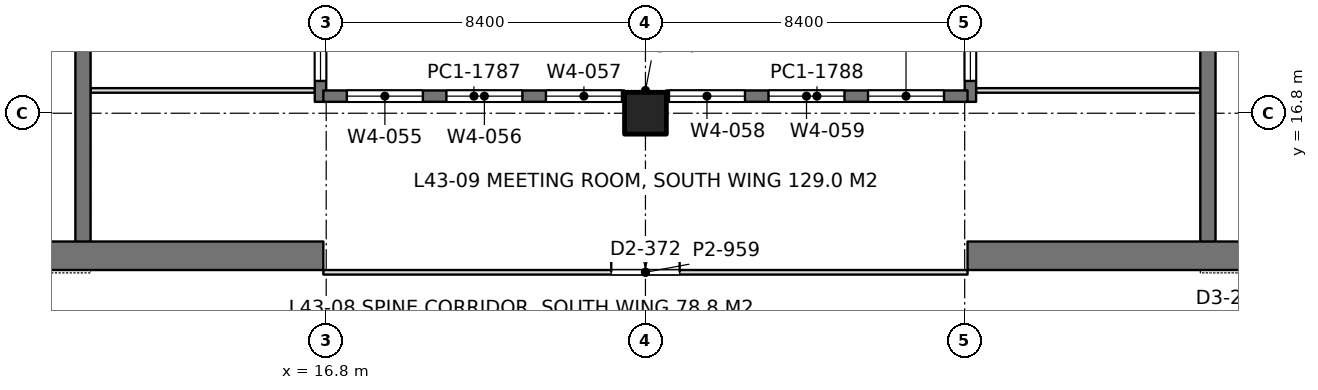
"""IFC4 building model, lengths in metres.
Left out: names, types, materials, properties, quantities, classifications, styles, units other than length and angle.
Written with IfcOpenShell. Run it as: python <this file> out.ifc"""

import sys

from ifc_helpers import new_model, si_unit, direction, frame, frame_2d, origin, origin_2d, place, context, subcontext, project, spatial, rectangle, extrude, element, fill, save


model = new_model("IFC4")
c1 = context("Model", 3, precision=1e-05, world=origin(), true_north=direction((0.0, 1.0)))
c2 = subcontext(c1, "Body", "Model", "MODEL_VIEW")
j1 = project(units=[si_unit("LENGTHUNIT", "METRE"), si_unit("PLANEANGLEUNIT", "RADIAN")], contexts=[c1])
p1 = place(None, origin())
s1 = spatial("IfcSite", under=j1, at=p1, CompositionType="ELEMENT")
p2 = place(p1, origin())
s2 = spatial("IfcBuilding", under=s1, at=p2, CompositionType="ELEMENT")
p3 = place(p2, frame((0.0, 0.0, 190.2)))
s3 = spatial("IfcBuildingStorey", under=s2, at=p3, CompositionType="ELEMENT", Elevation=190.2)
p4 = place(p3, frame((25.2, 16.8, 0.0), z_axis=(0.0, 0.0, 1.0), x_axis=(1.0, 0.0, 0.0)))
e1 = element("IfcColumn", 1, at=p4, inside=s3, PredefinedType="COLUMN", context=c2, shape_type="SweptSolid", body=[
    extrude(rectangle(XDim=1.1, YDim=1.1, at=origin_2d()), origin(), (0.0, 0.0, 1.0), 4.2),
])
p5 = place(p3, frame((-1.125, 13.05, 0.0), z_axis=(0.0, 0.0, 1.0), x_axis=(1.0, 0.0, 0.0)))
e2 = element("IfcWall", 2, at=p5, inside=s3, PredefinedType="SHEAR", context=c2, shape_type="SweptSolid", body=[
    extrude(rectangle(XDim=17.85, YDim=0.75, at=frame_2d((8.925, 0.0))), origin(), (0.0, 0.0, 1.0), 4.2),
])
p6 = place(p5, frame((8.875, 0.0, 0.0)))
e3 = element("IfcOpeningElement", 3, at=p6, cuts=e2, PredefinedType="OPENING", context=c2, shape_type="SweptSolid", body=[
    extrude(rectangle(XDim=1.8, YDim=2.4, at=frame_2d((0.9, 1.2))), frame((0.0, 0.385, 0.0), z_axis=(0.0, -1.0, 0.0), x_axis=(1.0, 0.0, 0.0)), (0.0, 0.0, 1.0), 0.77),
])
p7 = place(p3, frame((10.4, 13.05, 0.0), z_axis=(0.0, 0.0, 1.0), x_axis=(0.0, 1.0, 0.0)))
e4 = element("IfcWall", 4, at=p7, inside=s3, PredefinedType="SHEAR", context=c2, shape_type="SweptSolid", body=[
    extrude(rectangle(XDim=24.3, YDim=0.4, at=frame_2d((12.15, 0.0))), origin(), (0.0, 0.0, 1.0), 4.2),
])
p8 = place(p7, frame((15.75, 0.0, 0.0)))
e5 = element("IfcOpeningElement", 5, at=p8, cuts=e4, PredefinedType="OPENING", context=c2, shape_type="SweptSolid", body=[
    extrude(rectangle(XDim=1.1, YDim=2.2, at=frame_2d((0.55, 1.1))), frame((0.0, 0.21, 0.0), z_axis=(0.0, -1.0, 0.0), x_axis=(1.0, 0.0, 0.0)), (0.0, 0.0, 1.0), 0.42),
])
p9 = place(p7, frame((18.6, 0.0, 0.0)))
e6 = element("IfcOpeningElement", 6, at=p9, cuts=e4, PredefinedType="OPENING", context=c2, shape_type="SweptSolid", body=[
    extrude(rectangle(XDim=1.1, YDim=2.2, at=frame_2d((0.55, 1.1))), frame((0.0, 0.21, 0.0), z_axis=(0.0, -1.0, 0.0), x_axis=(1.0, 0.0, 0.0)), (0.0, 0.0, 1.0), 0.42),
])
p10 = place(p7, frame((21.45, 0.0, 0.0)))
e7 = element("IfcOpeningElement", 7, at=p10, cuts=e4, PredefinedType="OPENING", context=c2, shape_type="SweptSolid", body=[
    extrude(rectangle(XDim=1.1, YDim=2.2, at=frame_2d((0.55, 1.1))), frame((0.0, 0.21, 0.0), z_axis=(0.0, -1.0, 0.0), x_axis=(1.0, 0.0, 0.0)), (0.0, 0.0, 1.0), 0.42),
])
p11 = place(p7, frame((8.65, 0.0, 0.0)))
e8 = element("IfcOpeningElement", 8, at=p11, cuts=e4, PredefinedType="OPENING", context=c2, shape_type="SweptSolid", body=[
    extrude(rectangle(XDim=1.8, YDim=2.4, at=frame_2d((0.9, 1.2))), frame((0.0, 0.21, 0.0), z_axis=(0.0, -1.0, 0.0), x_axis=(1.0, 0.0, 0.0)), (0.0, 0.0, 1.0), 0.42),
])
p12 = place(p3, frame((33.675, 13.05, 0.0), z_axis=(0.0, 0.0, 1.0), x_axis=(1.0, 0.0, 0.0)))
e9 = element("IfcWall", 9, at=p12, inside=s3, PredefinedType="SHEAR", context=c2, shape_type="SweptSolid", body=[
    extrude(rectangle(XDim=17.85, YDim=0.75, at=frame_2d((8.925, 0.0))), origin(), (0.0, 0.0, 1.0), 4.2),
])
p13 = place(p12, frame((7.175, 0.0, 0.0)))
e10 = element("IfcOpeningElement", 10, at=p13, cuts=e9, PredefinedType="OPENING", context=c2, shape_type="SweptSolid", body=[
    extrude(rectangle(XDim=1.8, YDim=2.4, at=frame_2d((0.9, 1.2))), frame((0.0, 0.385, 0.0), z_axis=(0.0, -1.0, 0.0), x_axis=(1.0, 0.0, 0.0)), (0.0, 0.0, 1.0), 0.77),
])
p14 = place(p3, frame((40.0, 13.05, 0.0), z_axis=(0.0, 0.0, 1.0), x_axis=(0.0, 1.0, 0.0)))
e11 = element("IfcWall", 11, at=p14, inside=s3, PredefinedType="SHEAR", context=c2, shape_type="SweptSolid", body=[
    extrude(rectangle(XDim=24.3, YDim=0.4, at=frame_2d((12.15, 0.0))), origin(), (0.0, 0.0, 1.0), 4.2),
])
p15 = place(p14, frame((15.75, 0.0, 0.0)))
e12 = element("IfcOpeningElement", 12, at=p15, cuts=e11, PredefinedType="OPENING", context=c2, shape_type="SweptSolid", body=[
    extrude(rectangle(XDim=1.1, YDim=2.2, at=frame_2d((0.55, 1.1))), frame((0.0, 0.21, 0.0), z_axis=(0.0, -1.0, 0.0), x_axis=(1.0, 0.0, 0.0)), (0.0, 0.0, 1.0), 0.42),
])
p16 = place(p14, frame((18.6, 0.0, 0.0)))
e13 = element("IfcOpeningElement", 13, at=p16, cuts=e11, PredefinedType="OPENING", context=c2, shape_type="SweptSolid", body=[
    extrude(rectangle(XDim=1.1, YDim=2.2, at=frame_2d((0.55, 1.1))), frame((0.0, 0.21, 0.0), z_axis=(0.0, -1.0, 0.0), x_axis=(1.0, 0.0, 0.0)), (0.0, 0.0, 1.0), 0.42),
])
p17 = place(p14, frame((21.45, 0.0, 0.0)))
e14 = element("IfcOpeningElement", 14, at=p17, cuts=e11, PredefinedType="OPENING", context=c2, shape_type="SweptSolid", body=[
    extrude(rectangle(XDim=1.1, YDim=2.2, at=frame_2d((0.55, 1.1))), frame((0.0, 0.21, 0.0), z_axis=(0.0, -1.0, 0.0), x_axis=(1.0, 0.0, 0.0)), (0.0, 0.0, 1.0), 0.42),
])
p18 = place(p14, frame((8.65, 0.0, 0.0)))
e15 = element("IfcOpeningElement", 15, at=p18, cuts=e11, PredefinedType="OPENING", context=c2, shape_type="SweptSolid", body=[
    extrude(rectangle(XDim=1.8, YDim=2.4, at=frame_2d((0.9, 1.2))), frame((0.0, 0.21, 0.0), z_axis=(0.0, -1.0, 0.0), x_axis=(1.0, 0.0, 0.0)), (0.0, 0.0, 1.0), 0.42),
])
p19 = place(p3, frame((16.65, 17.1, 0.0), z_axis=(0.0, 0.0, 1.0), x_axis=(0.0, 1.0, 0.0)))
e16 = element("IfcWall", 16, at=p19, inside=s3, PredefinedType="SOLIDWALL", context=c2, shape_type="SweptSolid", body=[
    extrude(rectangle(XDim=10.7, YDim=0.3, at=frame_2d((5.35, 0.0))), origin(), (0.0, 0.0, 1.0), 4.05),
])
p20 = place(p19, frame((0.55, 0.0, 0.9)))
e17 = element("IfcOpeningElement", 17, at=p20, cuts=e16, PredefinedType="OPENING", context=c2, shape_type="SweptSolid", body=[
    extrude(rectangle(XDim=2.0, YDim=1.9, at=frame_2d((1.0, 0.95))), frame((0.0, 0.16, 0.0), z_axis=(0.0, -1.0, 0.0), x_axis=(1.0, 0.0, 0.0)), (0.0, 0.0, 1.0), 0.32),
])
p21 = place(p19, frame((2.9, 0.0, 0.9)))
e18 = element("IfcOpeningElement", 18, at=p21, cuts=e16, PredefinedType="OPENING", context=c2, shape_type="SweptSolid", body=[
    extrude(rectangle(XDim=2.0, YDim=1.9, at=frame_2d((1.0, 0.95))), frame((0.0, 0.16, 0.0), z_axis=(0.0, -1.0, 0.0), x_axis=(1.0, 0.0, 0.0)), (0.0, 0.0, 1.0), 0.32),
])
p22 = place(p19, frame((7.675, 0.0, 0.9)))
e19 = element("IfcOpeningElement", 19, at=p22, cuts=e16, PredefinedType="OPENING", context=c2, shape_type="SweptSolid", body=[
    extrude(rectangle(XDim=2.0, YDim=1.9, at=frame_2d((1.0, 0.95))), frame((0.0, 0.16, 0.0), z_axis=(0.0, -1.0, 0.0), x_axis=(1.0, 0.0, 0.0)), (0.0, 0.0, 1.0), 0.32),
])
p23 = place(p3, frame((33.75, 17.1, 0.0), z_axis=(0.0, 0.0, 1.0), x_axis=(0.0, 1.0, 0.0)))
e20 = element("IfcWall", 20, at=p23, inside=s3, PredefinedType="SOLIDWALL", context=c2, shape_type="SweptSolid", body=[
    extrude(rectangle(XDim=10.7, YDim=0.3, at=frame_2d((5.35, 0.0))), origin(), (0.0, 0.0, 1.0), 4.05),
])
p24 = place(p23, frame((0.55, 0.0, 0.9)))
e21 = element("IfcOpeningElement", 21, at=p24, cuts=e20, PredefinedType="OPENING", context=c2, shape_type="SweptSolid", body=[
    extrude(rectangle(XDim=2.0, YDim=1.9, at=frame_2d((1.0, 0.95))), frame((0.0, 0.16, 0.0), z_axis=(0.0, -1.0, 0.0), x_axis=(1.0, 0.0, 0.0)), (0.0, 0.0, 1.0), 0.32),
])
p25 = place(p23, frame((2.9, 0.0, 0.9)))
e22 = element("IfcOpeningElement", 22, at=p25, cuts=e20, PredefinedType="OPENING", context=c2, shape_type="SweptSolid", body=[
    extrude(rectangle(XDim=2.0, YDim=1.9, at=frame_2d((1.0, 0.95))), frame((0.0, 0.16, 0.0), z_axis=(0.0, -1.0, 0.0), x_axis=(1.0, 0.0, 0.0)), (0.0, 0.0, 1.0), 0.32),
])
p26 = place(p23, frame((7.675, 0.0, 0.9)))
e23 = element("IfcOpeningElement", 23, at=p26, cuts=e20, PredefinedType="OPENING", context=c2, shape_type="SweptSolid", body=[
    extrude(rectangle(XDim=2.0, YDim=1.9, at=frame_2d((1.0, 0.95))), frame((0.0, 0.16, 0.0), z_axis=(0.0, -1.0, 0.0), x_axis=(1.0, 0.0, 0.0)), (0.0, 0.0, 1.0), 0.32),
])
p27 = place(p3, frame((16.725, 17.25, 0.0), z_axis=(0.0, 0.0, 1.0), x_axis=(1.0, 0.0, 0.0)))
e24 = element("IfcWall", 24, at=p27, inside=s3, PredefinedType="SOLIDWALL", context=c2, shape_type="SweptSolid", body=[
    extrude(rectangle(XDim=7.925, YDim=0.3, at=frame_2d((3.962, 0.0))), origin(), (0.0, 0.0, 1.0), 4.05),
])
p28 = place(p27, frame((0.619, 0.0, 0.9)))
e25 = element("IfcOpeningElement", 25, at=p28, cuts=e24, PredefinedType="OPENING", context=c2, shape_type="SweptSolid", body=[
    extrude(rectangle(XDim=2.0, YDim=1.9, at=frame_2d((1.0, 0.95))), frame((0.0, 0.16, 0.0), z_axis=(0.0, -1.0, 0.0), x_axis=(1.0, 0.0, 0.0)), (0.0, 0.0, 1.0), 0.32),
])
p29 = place(p27, frame((3.238, 0.0, 0.9)))
e26 = element("IfcOpeningElement", 26, at=p29, cuts=e24, PredefinedType="OPENING", context=c2, shape_type="SweptSolid", body=[
    extrude(rectangle(XDim=2.0, YDim=1.9, at=frame_2d((1.0, 0.95))), frame((0.0, 0.16, 0.0), z_axis=(0.0, -1.0, 0.0), x_axis=(1.0, 0.0, 0.0)), (0.0, 0.0, 1.0), 0.32),
])
p30 = place(p27, frame((5.856, 0.0, 0.9)))
e27 = element("IfcOpeningElement", 27, at=p30, cuts=e24, PredefinedType="OPENING", context=c2, shape_type="SweptSolid", body=[
    extrude(rectangle(XDim=2.0, YDim=1.9, at=frame_2d((1.0, 0.95))), frame((0.0, 0.16, 0.0), z_axis=(0.0, -1.0, 0.0), x_axis=(1.0, 0.0, 0.0)), (0.0, 0.0, 1.0), 0.32),
])
p31 = place(p3, frame((25.75, 17.25, 0.0), z_axis=(0.0, 0.0, 1.0), x_axis=(1.0, 0.0, 0.0)))
e28 = element("IfcWall", 28, at=p31, inside=s3, PredefinedType="SOLIDWALL", context=c2, shape_type="SweptSolid", body=[
    extrude(rectangle(XDim=7.925, YDim=0.3, at=frame_2d((3.962, 0.0))), origin(), (0.0, 0.0, 1.0), 4.05),
])
p32 = place(p31, frame((0.069, 0.0, 0.9)))
e29 = element("IfcOpeningElement", 29, at=p32, cuts=e28, PredefinedType="OPENING", context=c2, shape_type="SweptSolid", body=[
    extrude(rectangle(XDim=2.0, YDim=1.9, at=frame_2d((1.0, 0.95))), frame((0.0, 0.16, 0.0), z_axis=(0.0, -1.0, 0.0), x_axis=(1.0, 0.0, 0.0)), (0.0, 0.0, 1.0), 0.32),
])
p33 = place(p31, frame((2.688, 0.0, 0.9)))
e30 = element("IfcOpeningElement", 30, at=p33, cuts=e28, PredefinedType="OPENING", context=c2, shape_type="SweptSolid", body=[
    extrude(rectangle(XDim=2.0, YDim=1.9, at=frame_2d((1.0, 0.95))), frame((0.0, 0.16, 0.0), z_axis=(0.0, -1.0, 0.0), x_axis=(1.0, 0.0, 0.0)), (0.0, 0.0, 1.0), 0.32),
])
p34 = place(p31, frame((5.306, 0.0, 0.9)))
e31 = element("IfcOpeningElement", 31, at=p34, cuts=e28, PredefinedType="OPENING", context=c2, shape_type="SweptSolid", body=[
    extrude(rectangle(XDim=2.0, YDim=1.9, at=frame_2d((1.0, 0.95))), frame((0.0, 0.16, 0.0), z_axis=(0.0, -1.0, 0.0), x_axis=(1.0, 0.0, 0.0)), (0.0, 0.0, 1.0), 0.32),
])
for number, where, z_axis, x_axis in (
    (32, (10.598, 17.4, 0.0), (0.0, 0.0, 1.0), (1.0, 0.0, 0.0)),
    (33, (33.898, 17.4, 0.0), (0.0, 0.0, 1.0), (1.0, 0.0, 0.0)),
):
    element("IfcWall", number, at=place(p3, frame(where, z_axis=z_axis, x_axis=x_axis)), inside=s3, PredefinedType="PARTITIONING", context=c2, shape_type="SweptSolid", body=[
        extrude(rectangle(XDim=5.904, YDim=0.12, at=frame_2d((2.952, 0.0))), origin(), (0.0, 0.0, 1.0), 3.55),
    ])
p35 = place(p3, frame((16.725, 12.615, 0.0), z_axis=(0.0, 0.0, 1.0), x_axis=(1.0, 0.0, 0.0)))
e34 = element("IfcWall", 34, at=p35, inside=s3, PredefinedType="PARTITIONING", context=c2, shape_type="SweptSolid", body=[
    extrude(rectangle(XDim=16.95, YDim=0.12, at=frame_2d((8.475, 0.0))), origin(), (0.0, 0.0, 1.0), 3.55),
])
p36 = place(p35, frame((7.575, 0.0, 0.0)))
e35 = element("IfcOpeningElement", 35, at=p36, cuts=e34, PredefinedType="OPENING", context=c2, shape_type="SweptSolid", body=[
    extrude(rectangle(XDim=1.8, YDim=2.2, at=frame_2d((0.9, 1.1))), frame((0.0, 0.07, 0.0), z_axis=(0.0, -1.0, 0.0), x_axis=(1.0, 0.0, 0.0)), (0.0, 0.0, 1.0), 0.14),
])
p37 = place(p20, origin())
e36 = element("IfcWindow", 36, at=p37, inside=s3, PartitioningType="SINGLE_PANEL", PredefinedType="WINDOW", context=c2, shape_type="SweptSolid", body=[
    extrude(rectangle(XDim=2.0, YDim=1.9, at=frame_2d((1.0, 0.95))), frame((0.0, 0.03, 0.0), z_axis=(0.0, -1.0, 0.0), x_axis=(1.0, 0.0, 0.0)), (0.0, 0.0, 1.0), 0.06),
])
fill(e17, e36)
p38 = place(p24, origin())
e37 = element("IfcWindow", 37, at=p38, inside=s3, PartitioningType="SINGLE_PANEL", PredefinedType="WINDOW", context=c2, shape_type="SweptSolid", body=[
    extrude(rectangle(XDim=2.0, YDim=1.9, at=frame_2d((1.0, 0.95))), frame((0.0, 0.03, 0.0), z_axis=(0.0, -1.0, 0.0), x_axis=(1.0, 0.0, 0.0)), (0.0, 0.0, 1.0), 0.06),
])
fill(e21, e37)
p39 = place(p28, origin())
e38 = element("IfcWindow", 38, at=p39, inside=s3, PartitioningType="SINGLE_PANEL", PredefinedType="WINDOW", context=c2, shape_type="SweptSolid", body=[
    extrude(rectangle(XDim=2.0, YDim=1.9, at=frame_2d((1.0, 0.95))), frame((0.0, 0.03, 0.0), z_axis=(0.0, -1.0, 0.0), x_axis=(1.0, 0.0, 0.0)), (0.0, 0.0, 1.0), 0.06),
])
fill(e25, e38)
p40 = place(p29, origin())
e39 = element("IfcWindow", 39, at=p40, inside=s3, PartitioningType="SINGLE_PANEL", PredefinedType="WINDOW", context=c2, shape_type="SweptSolid", body=[
    extrude(rectangle(XDim=2.0, YDim=1.9, at=frame_2d((1.0, 0.95))), frame((0.0, 0.03, 0.0), z_axis=(0.0, -1.0, 0.0), x_axis=(1.0, 0.0, 0.0)), (0.0, 0.0, 1.0), 0.06),
])
fill(e26, e39)
p41 = place(p30, origin())
e40 = element("IfcWindow", 40, at=p41, inside=s3, PartitioningType="SINGLE_PANEL", PredefinedType="WINDOW", context=c2, shape_type="SweptSolid", body=[
    extrude(rectangle(XDim=2.0, YDim=1.9, at=frame_2d((1.0, 0.95))), frame((0.0, 0.03, 0.0), z_axis=(0.0, -1.0, 0.0), x_axis=(1.0, 0.0, 0.0)), (0.0, 0.0, 1.0), 0.06),
])
fill(e27, e40)
p42 = place(p32, origin())
e41 = element("IfcWindow", 41, at=p42, inside=s3, PartitioningType="SINGLE_PANEL", PredefinedType="WINDOW", context=c2, shape_type="SweptSolid", body=[
    extrude(rectangle(XDim=2.0, YDim=1.9, at=frame_2d((1.0, 0.95))), frame((0.0, 0.03, 0.0), z_axis=(0.0, -1.0, 0.0), x_axis=(1.0, 0.0, 0.0)), (0.0, 0.0, 1.0), 0.06),
])
fill(e29, e41)
p43 = place(p33, origin())
e42 = element("IfcWindow", 42, at=p43, inside=s3, PartitioningType="SINGLE_PANEL", PredefinedType="WINDOW", context=c2, shape_type="SweptSolid", body=[
    extrude(rectangle(XDim=2.0, YDim=1.9, at=frame_2d((1.0, 0.95))), frame((0.0, 0.03, 0.0), z_axis=(0.0, -1.0, 0.0), x_axis=(1.0, 0.0, 0.0)), (0.0, 0.0, 1.0), 0.06),
])
fill(e30, e42)
p44 = place(p34, origin())
e43 = element("IfcWindow", 43, at=p44, inside=s3, PartitioningType="SINGLE_PANEL", PredefinedType="WINDOW", context=c2, shape_type="SweptSolid", body=[
    extrude(rectangle(XDim=2.0, YDim=1.9, at=frame_2d((1.0, 0.95))), frame((0.0, 0.03, 0.0), z_axis=(0.0, -1.0, 0.0), x_axis=(1.0, 0.0, 0.0)), (0.0, 0.0, 1.0), 0.06),
])
fill(e31, e43)
p45 = place(p36, origin())
e44 = element("IfcDoor", 44, at=p45, inside=s3, OperationType="DOUBLE_DOOR_SINGLE_SWING", PredefinedType="DOOR", context=c2, shape_type="SweptSolid", body=[
    extrude(rectangle(XDim=1.8, YDim=2.2, at=frame_2d((0.9, 1.1))), frame((0.0, 0.025, 0.0), z_axis=(0.0, -1.0, 0.0), x_axis=(1.0, 0.0, 0.0)), (0.0, 0.0, 1.0), 0.05),
])
fill(e35, e44)
save(model, sys.argv[1])
